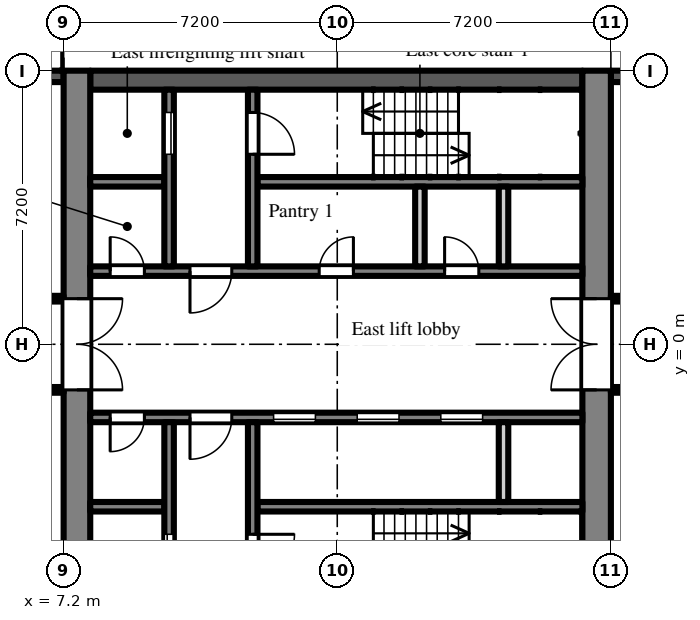
"""IFC4 building model, lengths in metres.
Left out: names, types, materials, properties, quantities, classifications, styles, units other than length and angle.
Written with IfcOpenShell. Run it as: python <this file> out.ifc"""

import sys

from ifc_helpers import new_model, si_unit, direction, frame, frame_2d, origin, place, context, subcontext, project, spatial, rectangle, extrude, element, fill, save


model = new_model("IFC4")
c1 = context("Model", 3, precision=1e-05, world=origin(), true_north=direction((0.0, 1.0)))
c2 = subcontext(c1, "Body", "Model", "MODEL_VIEW")
j1 = project(units=[si_unit("LENGTHUNIT", "METRE"), si_unit("PLANEANGLEUNIT", "RADIAN")], contexts=[c1])
p1 = place(None, origin())
s1 = spatial("IfcSite", under=j1, at=p1, CompositionType="ELEMENT")
p2 = place(p1, origin())
s2 = spatial("IfcBuilding", under=s1, at=p2, CompositionType="ELEMENT")
p3 = place(p2, frame((0.0, 0.0, 84.9)))
s3 = spatial("IfcBuildingStorey", under=s2, at=p3, CompositionType="ELEMENT", Elevation=84.9)
p4 = place(p3, frame((24.3, 7.05, 0.0), z_axis=(0.0, 0.0, 1.0), x_axis=(-1.0, 0.0, 0.0)))
e1 = element("IfcWall", 1, at=p4, inside=s3, PredefinedType="SOLIDWALL", context=c2, shape_type="SweptSolid", body=[
    extrude(rectangle(XDim=2.7, YDim=0.3, at=frame_2d((1.35, 0.0))), origin(), (0.0, 0.0, 1.0), 2.1),
])
p5 = place(p4, frame((0.75, 0.0, 0.2)))
e2 = element("IfcOpeningElement", 2, at=p5, cuts=e1, PredefinedType="OPENING", context=c2, shape_type="SweptSolid", body=[
    extrude(rectangle(XDim=1.2, YDim=1.85, at=frame_2d((0.6, 0.925))), frame((0.0, 0.16, 0.0), z_axis=(0.0, -1.0, 0.0), x_axis=(1.0, 0.0, 0.0)), (0.0, 0.0, 1.0), 0.32),
])
p6 = place(p3, frame((7.2, 7.05, 0.0), z_axis=(0.0, 0.0, 1.0), x_axis=(-1.0, 0.0, 0.0)))
e3 = element("IfcWall", 3, at=p6, inside=s3, PredefinedType="SOLIDWALL", context=c2, shape_type="SweptSolid", body=[
    extrude(rectangle(XDim=3.0, YDim=0.3, at=frame_2d((1.5, 0.0))), origin(), (0.0, 0.0, 1.0), 2.1),
])
p7 = place(p3, frame((7.55, -7.2, 0.0), z_axis=(0.0, 0.0, 1.0), x_axis=(0.0, 1.0, 0.0)))
e4 = element("IfcWall", 4, at=p7, inside=s3, PredefinedType="SHEAR", context=c2, shape_type="SweptSolid", body=[
    extrude(rectangle(XDim=14.4, YDim=0.7, at=frame_2d((7.2, 0.0))), origin(), (0.0, 0.0, 1.0), 2.575),
])
p8 = place(p7, frame((6.0, 0.0, 0.0)))
e5 = element("IfcOpeningElement", 5, at=p8, cuts=e4, PredefinedType="OPENING", context=c2, shape_type="SweptSolid", body=[
    extrude(rectangle(XDim=2.4, YDim=2.2, at=frame_2d((1.2, 1.1))), frame((0.0, 0.36, 0.0), z_axis=(0.0, -1.0, 0.0), x_axis=(1.0, 0.0, 0.0)), (0.0, 0.0, 1.0), 0.72),
])
p9 = place(p3, frame((21.225, -7.2, 0.0), z_axis=(0.0, 0.0, 1.0), x_axis=(0.0, 1.0, 0.0)))
e6 = element("IfcWall", 6, at=p9, inside=s3, PredefinedType="SHEAR", context=c2, shape_type="SweptSolid", body=[
    extrude(rectangle(XDim=14.4, YDim=0.75, at=frame_2d((7.2, 0.0))), origin(), (0.0, 0.0, 1.0), 2.575),
])
p10 = place(p9, frame((6.0, 0.0, 0.0)))
e7 = element("IfcOpeningElement", 7, at=p10, cuts=e6, PredefinedType="OPENING", context=c2, shape_type="SweptSolid", body=[
    extrude(rectangle(XDim=2.4, YDim=2.2, at=frame_2d((1.2, 1.1))), frame((0.0, 0.385, 0.0), z_axis=(0.0, -1.0, 0.0), x_axis=(1.0, 0.0, 0.0)), (0.0, 0.0, 1.0), 0.77),
])
p11 = place(p3, frame((7.9, 6.95, 0.0), z_axis=(0.0, 0.0, 1.0), x_axis=(1.0, 0.0, 0.0)))
e8 = element("IfcWall", 8, at=p11, inside=s3, PredefinedType="SHEAR", context=c2, shape_type="SweptSolid", body=[
    extrude(rectangle(XDim=12.95, YDim=0.5, at=frame_2d((6.475, 0.0))), origin(), (0.0, 0.0, 1.0), 2.575),
])
p12 = place(p3, frame((7.9, 1.925, 0.0), z_axis=(0.0, 0.0, 1.0), x_axis=(1.0, 0.0, 0.0)))
e9 = element("IfcWall", 9, at=p12, inside=s3, PredefinedType="SHEAR", context=c2, shape_type="SweptSolid", body=[
    extrude(rectangle(XDim=12.95, YDim=0.25, at=frame_2d((6.475, 0.0))), origin(), (0.0, 0.0, 1.0), 2.575),
])
p13 = place(p12, frame((0.525, 0.0, 0.0)))
e10 = element("IfcOpeningElement", 10, at=p13, cuts=e9, PredefinedType="OPENING", context=c2, shape_type="SweptSolid", body=[
    extrude(rectangle(XDim=0.9, YDim=2.1, at=frame_2d((0.45, 1.05))), frame((0.0, 0.135, 0.0), z_axis=(0.0, -1.0, 0.0), x_axis=(1.0, 0.0, 0.0)), (0.0, 0.0, 1.0), 0.27),
])
p14 = place(p12, frame((2.625, 0.0, 0.0)))
e11 = element("IfcOpeningElement", 11, at=p14, cuts=e9, PredefinedType="OPENING", context=c2, shape_type="SweptSolid", body=[
    extrude(rectangle(XDim=1.1, YDim=2.1, at=frame_2d((0.55, 1.05))), frame((0.0, 0.135, 0.0), z_axis=(0.0, -1.0, 0.0), x_axis=(1.0, 0.0, 0.0)), (0.0, 0.0, 1.0), 0.27),
])
p15 = place(p12, frame((6.025, 0.0, 0.0)))
e12 = element("IfcOpeningElement", 12, at=p15, cuts=e9, PredefinedType="OPENING", context=c2, shape_type="SweptSolid", body=[
    extrude(rectangle(XDim=0.9, YDim=2.1, at=frame_2d((0.45, 1.05))), frame((0.0, 0.135, 0.0), z_axis=(0.0, -1.0, 0.0), x_axis=(1.0, 0.0, 0.0)), (0.0, 0.0, 1.0), 0.27),
])
p16 = place(p12, frame((9.325, 0.0, 0.0)))
e13 = element("IfcOpeningElement", 13, at=p16, cuts=e9, PredefinedType="OPENING", context=c2, shape_type="SweptSolid", body=[
    extrude(rectangle(XDim=0.9, YDim=2.1, at=frame_2d((0.45, 1.05))), frame((0.0, 0.135, 0.0), z_axis=(0.0, -1.0, 0.0), x_axis=(1.0, 0.0, 0.0)), (0.0, 0.0, 1.0), 0.27),
])
p17 = place(p3, frame((7.9, 4.275, 0.0), z_axis=(0.0, 0.0, 1.0), x_axis=(1.0, 0.0, 0.0)))
e14 = element("IfcWall", 14, at=p17, inside=s3, PredefinedType="SHEAR", context=c2, shape_type="SweptSolid", body=[
    extrude(rectangle(XDim=1.95, YDim=0.25, at=frame_2d((0.975, 0.0))), origin(), (0.0, 0.0, 1.0), 2.575),
])
p18 = place(p3, frame((12.3, 4.275, 0.0), z_axis=(0.0, 0.0, 1.0), x_axis=(1.0, 0.0, 0.0)))
e15 = element("IfcWall", 15, at=p18, inside=s3, PredefinedType="SHEAR", context=c2, shape_type="SweptSolid", body=[
    extrude(rectangle(XDim=8.55, YDim=0.25, at=frame_2d((4.275, 0.0))), origin(), (0.0, 0.0, 1.0), 2.575),
])
p19 = place(p3, frame((9.975, 2.05, 0.0), z_axis=(0.0, 0.0, 1.0), x_axis=(0.0, 1.0, 0.0)))
e16 = element("IfcWall", 16, at=p19, inside=s3, PredefinedType="SHEAR", context=c2, shape_type="SweptSolid", body=[
    extrude(rectangle(XDim=4.65, YDim=0.25, at=frame_2d((2.325, 0.0))), origin(), (0.0, 0.0, 1.0), 2.575),
])
p20 = place(p19, frame((2.95, 0.0, 0.0)))
e17 = element("IfcOpeningElement", 17, at=p20, cuts=e16, PredefinedType="OPENING", context=c2, shape_type="SweptSolid", body=[
    extrude(rectangle(XDim=1.1, YDim=2.1, at=frame_2d((0.55, 1.05))), frame((0.0, 0.135, 0.0), z_axis=(0.0, -1.0, 0.0), x_axis=(1.0, 0.0, 0.0)), (0.0, 0.0, 1.0), 0.27),
])
p21 = place(p3, frame((12.175, 2.05, 0.0), z_axis=(0.0, 0.0, 1.0), x_axis=(0.0, 1.0, 0.0)))
e18 = element("IfcWall", 18, at=p21, inside=s3, PredefinedType="SHEAR", context=c2, shape_type="SweptSolid", body=[
    extrude(rectangle(XDim=4.65, YDim=0.25, at=frame_2d((2.325, 0.0))), origin(), (0.0, 0.0, 1.0), 2.575),
])
p22 = place(p21, frame((2.95, 0.0, 0.0)))
e19 = element("IfcOpeningElement", 19, at=p22, cuts=e18, PredefinedType="OPENING", context=c2, shape_type="SweptSolid", body=[
    extrude(rectangle(XDim=1.1, YDim=2.1, at=frame_2d((0.55, 1.05))), frame((0.0, 0.135, 0.0), z_axis=(0.0, -1.0, 0.0), x_axis=(1.0, 0.0, 0.0)), (0.0, 0.0, 1.0), 0.27),
])
for number, where, z_axis, x_axis in (
    (20, (16.575, 2.05, 0.0), (0.0, 0.0, 1.0), (0.0, 1.0, 0.0)),
    (21, (18.775, 2.05, 0.0), (0.0, 0.0, 1.0), (0.0, 1.0, 0.0)),
):
    element("IfcWall", number, at=place(p3, frame(where, z_axis=z_axis, x_axis=x_axis)), inside=s3, PredefinedType="PARTITIONING", context=c2, shape_type="SweptSolid", body=[
        extrude(rectangle(XDim=2.1, YDim=0.25, at=frame_2d((1.05, 0.0))), origin(), (0.0, 0.0, 1.0), 2.575),
    ])
p23 = place(p3, frame((7.9, -1.925, 0.0), z_axis=(0.0, 0.0, 1.0), x_axis=(1.0, 0.0, 0.0)))
e22 = element("IfcWall", 22, at=p23, inside=s3, PredefinedType="SHEAR", context=c2, shape_type="SweptSolid", body=[
    extrude(rectangle(XDim=12.95, YDim=0.25, at=frame_2d((6.475, 0.0))), origin(), (0.0, 0.0, 1.0), 2.575),
])
p24 = place(p23, frame((4.825, 0.0, 0.0)))
e23 = element("IfcOpeningElement", 23, at=p24, cuts=e22, PredefinedType="OPENING", context=c2, shape_type="SweptSolid", body=[
    extrude(rectangle(XDim=1.1, YDim=2.1, at=frame_2d((0.55, 1.05))), frame((0.0, 0.135, 0.0), z_axis=(0.0, -1.0, 0.0), x_axis=(1.0, 0.0, 0.0)), (0.0, 0.0, 1.0), 0.27),
])
p25 = place(p23, frame((7.025, 0.0, 0.0)))
e24 = element("IfcOpeningElement", 24, at=p25, cuts=e22, PredefinedType="OPENING", context=c2, shape_type="SweptSolid", body=[
    extrude(rectangle(XDim=1.1, YDim=2.1, at=frame_2d((0.55, 1.05))), frame((0.0, 0.135, 0.0), z_axis=(0.0, -1.0, 0.0), x_axis=(1.0, 0.0, 0.0)), (0.0, 0.0, 1.0), 0.27),
])
p26 = place(p23, frame((9.225, 0.0, 0.0)))
e25 = element("IfcOpeningElement", 25, at=p26, cuts=e22, PredefinedType="OPENING", context=c2, shape_type="SweptSolid", body=[
    extrude(rectangle(XDim=1.1, YDim=2.1, at=frame_2d((0.55, 1.05))), frame((0.0, 0.135, 0.0), z_axis=(0.0, -1.0, 0.0), x_axis=(1.0, 0.0, 0.0)), (0.0, 0.0, 1.0), 0.27),
])
p27 = place(p23, frame((0.525, 0.0, 0.0)))
e26 = element("IfcOpeningElement", 26, at=p27, cuts=e22, PredefinedType="OPENING", context=c2, shape_type="SweptSolid", body=[
    extrude(rectangle(XDim=0.9, YDim=2.1, at=frame_2d((0.45, 1.05))), frame((0.0, 0.135, 0.0), z_axis=(0.0, -1.0, 0.0), x_axis=(1.0, 0.0, 0.0)), (0.0, 0.0, 1.0), 0.27),
])
p28 = place(p23, frame((2.625, 0.0, 0.0)))
e27 = element("IfcOpeningElement", 27, at=p28, cuts=e22, PredefinedType="OPENING", context=c2, shape_type="SweptSolid", body=[
    extrude(rectangle(XDim=1.1, YDim=2.1, at=frame_2d((0.55, 1.05))), frame((0.0, 0.135, 0.0), z_axis=(0.0, -1.0, 0.0), x_axis=(1.0, 0.0, 0.0)), (0.0, 0.0, 1.0), 0.27),
])
p29 = place(p3, frame((7.9, -4.275, 0.0), z_axis=(0.0, 0.0, 1.0), x_axis=(1.0, 0.0, 0.0)))
e28 = element("IfcWall", 28, at=p29, inside=s3, PredefinedType="SHEAR", context=c2, shape_type="SweptSolid", body=[
    extrude(rectangle(XDim=1.95, YDim=0.25, at=frame_2d((0.975, 0.0))), origin(), (0.0, 0.0, 1.0), 2.575),
])
p30 = place(p3, frame((12.3, -4.275, 0.0), z_axis=(0.0, 0.0, 1.0), x_axis=(1.0, 0.0, 0.0)))
e29 = element("IfcWall", 29, at=p30, inside=s3, PredefinedType="SHEAR", context=c2, shape_type="SweptSolid", body=[
    extrude(rectangle(XDim=8.55, YDim=0.25, at=frame_2d((4.275, 0.0))), origin(), (0.0, 0.0, 1.0), 2.575),
])
p31 = place(p3, frame((9.975, -2.05, 0.0), z_axis=(0.0, 0.0, 1.0), x_axis=(0.0, -1.0, 0.0)))
e30 = element("IfcWall", 30, at=p31, inside=s3, PredefinedType="SHEAR", context=c2, shape_type="SweptSolid", body=[
    extrude(rectangle(XDim=4.65, YDim=0.25, at=frame_2d((2.325, 0.0))), origin(), (0.0, 0.0, 1.0), 2.575),
])
p32 = place(p31, frame((2.95, 0.0, 0.0)))
e31 = element("IfcOpeningElement", 31, at=p32, cuts=e30, PredefinedType="OPENING", context=c2, shape_type="SweptSolid", body=[
    extrude(rectangle(XDim=1.1, YDim=2.1, at=frame_2d((0.55, 1.05))), frame((0.0, 0.135, 0.0), z_axis=(0.0, -1.0, 0.0), x_axis=(1.0, 0.0, 0.0)), (0.0, 0.0, 1.0), 0.27),
])
p33 = place(p3, frame((12.175, -2.05, 0.0), z_axis=(0.0, 0.0, 1.0), x_axis=(0.0, -1.0, 0.0)))
e32 = element("IfcWall", 32, at=p33, inside=s3, PredefinedType="SHEAR", context=c2, shape_type="SweptSolid", body=[
    extrude(rectangle(XDim=4.65, YDim=0.25, at=frame_2d((2.325, 0.0))), origin(), (0.0, 0.0, 1.0), 2.575),
])
p34 = place(p33, frame((2.95, 0.0, 0.0)))
e33 = element("IfcOpeningElement", 33, at=p34, cuts=e32, PredefinedType="OPENING", context=c2, shape_type="SweptSolid", body=[
    extrude(rectangle(XDim=1.1, YDim=2.1, at=frame_2d((0.55, 1.05))), frame((0.0, 0.135, 0.0), z_axis=(0.0, -1.0, 0.0), x_axis=(1.0, 0.0, 0.0)), (0.0, 0.0, 1.0), 0.27),
])
p35 = place(p3, frame((18.775, -2.05, 0.0), z_axis=(0.0, 0.0, 1.0), x_axis=(0.0, -1.0, 0.0)))
e34 = element("IfcWall", 34, at=p35, inside=s3, PredefinedType="PARTITIONING", context=c2, shape_type="SweptSolid", body=[
    extrude(rectangle(XDim=2.1, YDim=0.25, at=frame_2d((1.05, 0.0))), origin(), (0.0, 0.0, 1.0), 2.575),
])
p36 = place(p3, frame((1.275, -1.2, 0.0), z_axis=(0.0, 0.0, 1.0), x_axis=(1.0, 0.0, 0.0)))
e35 = element("IfcWall", 35, at=p36, inside=s3, PredefinedType="PARTITIONING", context=c2, shape_type="SweptSolid", body=[
    extrude(rectangle(XDim=5.925, YDim=0.15, at=frame_2d((2.962, 0.0))), origin(), (0.0, 0.0, 1.0), 2.575),
])
p37 = place(p36, frame((3.475, 0.0, 0.0)))
e36 = element("IfcOpeningElement", 36, at=p37, cuts=e35, PredefinedType="OPENING", context=c2, shape_type="SweptSolid", body=[
    extrude(rectangle(XDim=0.9, YDim=2.1, at=frame_2d((0.45, 1.05))), frame((0.0, 0.085, 0.0), z_axis=(0.0, -1.0, 0.0), x_axis=(1.0, 0.0, 0.0)), (0.0, 0.0, 1.0), 0.17),
])
p38 = place(p3, frame((1.275, 1.2, 0.0), z_axis=(0.0, 0.0, 1.0), x_axis=(1.0, 0.0, 0.0)))
e37 = element("IfcWall", 37, at=p38, inside=s3, PredefinedType="PARTITIONING", context=c2, shape_type="SweptSolid", body=[
    extrude(rectangle(XDim=5.925, YDim=0.15, at=frame_2d((2.962, 0.0))), origin(), (0.0, 0.0, 1.0), 2.575),
])
p39 = place(p38, frame((0.675, 0.0, 0.0)))
e38 = element("IfcOpeningElement", 38, at=p39, cuts=e37, PredefinedType="OPENING", context=c2, shape_type="SweptSolid", body=[
    extrude(rectangle(XDim=0.9, YDim=2.1, at=frame_2d((0.45, 1.05))), frame((0.0, 0.085, 0.0), z_axis=(0.0, -1.0, 0.0), x_axis=(1.0, 0.0, 0.0)), (0.0, 0.0, 1.0), 0.17),
])
p40 = place(p38, frame((3.075, 0.0, 0.0)))
e39 = element("IfcOpeningElement", 39, at=p40, cuts=e37, PredefinedType="OPENING", context=c2, shape_type="SweptSolid", body=[
    extrude(rectangle(XDim=0.9, YDim=2.1, at=frame_2d((0.45, 1.05))), frame((0.0, 0.085, 0.0), z_axis=(0.0, -1.0, 0.0), x_axis=(1.0, 0.0, 0.0)), (0.0, 0.0, 1.0), 0.17),
])
p41 = place(p3, frame((21.6, -1.2, 0.0), z_axis=(0.0, 0.0, 1.0), x_axis=(1.0, 0.0, 0.0)))
e40 = element("IfcWall", 40, at=p41, inside=s3, PredefinedType="PARTITIONING", context=c2, shape_type="SweptSolid", body=[
    extrude(rectangle(XDim=14.9, YDim=0.15, at=frame_2d((7.45, 0.0))), origin(), (0.0, 0.0, 1.0), 2.575),
])
p42 = place(p41, frame((2.7, 0.0, 0.0)))
e41 = element("IfcOpeningElement", 41, at=p42, cuts=e40, PredefinedType="OPENING", context=c2, shape_type="SweptSolid", body=[
    extrude(rectangle(XDim=1.8, YDim=2.1, at=frame_2d((0.9, 1.05))), frame((0.0, 0.085, 0.0), z_axis=(0.0, -1.0, 0.0), x_axis=(1.0, 0.0, 0.0)), (0.0, 0.0, 1.0), 0.17),
])
p43 = place(p41, frame((8.55, 0.0, 0.0)))
e42 = element("IfcOpeningElement", 42, at=p43, cuts=e40, PredefinedType="OPENING", context=c2, shape_type="SweptSolid", body=[
    extrude(rectangle(XDim=0.9, YDim=2.1, at=frame_2d((0.45, 1.05))), frame((0.0, 0.085, 0.0), z_axis=(0.0, -1.0, 0.0), x_axis=(1.0, 0.0, 0.0)), (0.0, 0.0, 1.0), 0.17),
])
p44 = place(p41, frame((11.95, 0.0, 0.0)))
e43 = element("IfcOpeningElement", 43, at=p44, cuts=e40, PredefinedType="OPENING", context=c2, shape_type="SweptSolid", body=[
    extrude(rectangle(XDim=1.8, YDim=2.1, at=frame_2d((0.9, 1.05))), frame((0.0, 0.085, 0.0), z_axis=(0.0, -1.0, 0.0), x_axis=(1.0, 0.0, 0.0)), (0.0, 0.0, 1.0), 0.17),
])
p45 = place(p3, frame((21.6, 1.2, 0.0), z_axis=(0.0, 0.0, 1.0), x_axis=(1.0, 0.0, 0.0)))
e44 = element("IfcWall", 44, at=p45, inside=s3, PredefinedType="PARTITIONING", context=c2, shape_type="SweptSolid", body=[
    extrude(rectangle(XDim=14.9, YDim=0.15, at=frame_2d((7.45, 0.0))), origin(), (0.0, 0.0, 1.0), 2.575),
])
p46 = place(p45, frame((6.0, 0.0, 0.0)))
e45 = element("IfcOpeningElement", 45, at=p46, cuts=e44, PredefinedType="OPENING", context=c2, shape_type="SweptSolid", body=[
    extrude(rectangle(XDim=1.0, YDim=2.1, at=frame_2d((0.5, 1.05))), frame((0.0, 0.085, 0.0), z_axis=(0.0, -1.0, 0.0), x_axis=(1.0, 0.0, 0.0)), (0.0, 0.0, 1.0), 0.17),
])
p47 = place(p45, frame((9.6, 0.0, 0.0)))
e46 = element("IfcOpeningElement", 46, at=p47, cuts=e44, PredefinedType="OPENING", context=c2, shape_type="SweptSolid", body=[
    extrude(rectangle(XDim=1.0, YDim=2.1, at=frame_2d((0.5, 1.05))), frame((0.0, 0.085, 0.0), z_axis=(0.0, -1.0, 0.0), x_axis=(1.0, 0.0, 0.0)), (0.0, 0.0, 1.0), 0.17),
])
p48 = place(p45, frame((11.95, 0.0, 0.0)))
e47 = element("IfcOpeningElement", 47, at=p48, cuts=e44, PredefinedType="OPENING", context=c2, shape_type="SweptSolid", body=[
    extrude(rectangle(XDim=1.8, YDim=2.1, at=frame_2d((0.9, 1.05))), frame((0.0, 0.085, 0.0), z_axis=(0.0, -1.0, 0.0), x_axis=(1.0, 0.0, 0.0)), (0.0, 0.0, 1.0), 0.17),
])
p49 = place(p24, origin())
e48 = element("IfcDoor", 48, at=p49, inside=s3, OperationType="SLIDING_TO_LEFT", PredefinedType="DOOR", context=c2, shape_type="SweptSolid", body=[
    extrude(rectangle(XDim=1.1, YDim=2.1, at=frame_2d((0.55, 1.05))), frame((0.0, 0.025, 0.0), z_axis=(0.0, -1.0, 0.0), x_axis=(1.0, 0.0, 0.0)), (0.0, 0.0, 1.0), 0.05),
])
fill(e23, e48)
p50 = place(p25, origin())
e49 = element("IfcDoor", 49, at=p50, inside=s3, OperationType="SLIDING_TO_LEFT", PredefinedType="DOOR", context=c2, shape_type="SweptSolid", body=[
    extrude(rectangle(XDim=1.1, YDim=2.1, at=frame_2d((0.55, 1.05))), frame((0.0, 0.025, 0.0), z_axis=(0.0, -1.0, 0.0), x_axis=(1.0, 0.0, 0.0)), (0.0, 0.0, 1.0), 0.05),
])
fill(e24, e49)
p51 = place(p26, origin())
e50 = element("IfcDoor", 50, at=p51, inside=s3, OperationType="SLIDING_TO_LEFT", PredefinedType="DOOR", context=c2, shape_type="SweptSolid", body=[
    extrude(rectangle(XDim=1.1, YDim=2.1, at=frame_2d((0.55, 1.05))), frame((0.0, 0.025, 0.0), z_axis=(0.0, -1.0, 0.0), x_axis=(1.0, 0.0, 0.0)), (0.0, 0.0, 1.0), 0.05),
])
fill(e25, e50)
p52 = place(p20, origin())
e51 = element("IfcDoor", 51, at=p52, inside=s3, OperationType="SLIDING_TO_LEFT", PredefinedType="DOOR", context=c2, shape_type="SweptSolid", body=[
    extrude(rectangle(XDim=1.1, YDim=2.1, at=frame_2d((0.55, 1.05))), frame((0.0, 0.025, 0.0), z_axis=(0.0, -1.0, 0.0), x_axis=(1.0, 0.0, 0.0)), (0.0, 0.0, 1.0), 0.05),
])
fill(e17, e51)
p53 = place(p32, origin())
e52 = element("IfcDoor", 52, at=p53, inside=s3, OperationType="SLIDING_TO_LEFT", PredefinedType="DOOR", context=c2, shape_type="SweptSolid", body=[
    extrude(rectangle(XDim=1.1, YDim=2.1, at=frame_2d((0.55, 1.05))), frame((0.0, 0.025, 0.0), z_axis=(0.0, -1.0, 0.0), x_axis=(1.0, 0.0, 0.0)), (0.0, 0.0, 1.0), 0.05),
])
fill(e31, e52)
p54 = place(p22, frame((1.1, 0.0, 0.0), z_axis=(0.0, 0.0, 1.0), x_axis=(-1.0, 0.0, 0.0)))
e53 = element("IfcDoor", 53, at=p54, inside=s3, OperationType="SINGLE_SWING_RIGHT", PredefinedType="DOOR", context=c2, shape_type="SweptSolid", body=[
    extrude(rectangle(XDim=1.1, YDim=2.1, at=frame_2d((0.55, 1.05))), frame((0.0, 0.025, 0.0), z_axis=(0.0, -1.0, 0.0), x_axis=(1.0, 0.0, 0.0)), (0.0, 0.0, 1.0), 0.05),
])
fill(e19, e53)
p55 = place(p34, origin())
e54 = element("IfcDoor", 54, at=p55, inside=s3, OperationType="SINGLE_SWING_LEFT", PredefinedType="DOOR", context=c2, shape_type="SweptSolid", body=[
    extrude(rectangle(XDim=1.1, YDim=2.1, at=frame_2d((0.55, 1.05))), frame((0.0, 0.025, 0.0), z_axis=(0.0, -1.0, 0.0), x_axis=(1.0, 0.0, 0.0)), (0.0, 0.0, 1.0), 0.05),
])
fill(e33, e54)
p56 = place(p13, origin())
e55 = element("IfcDoor", 55, at=p56, inside=s3, OperationType="SINGLE_SWING_LEFT", PredefinedType="DOOR", context=c2, shape_type="SweptSolid", body=[
    extrude(rectangle(XDim=0.9, YDim=2.1, at=frame_2d((0.45, 1.05))), frame((0.0, 0.025, 0.0), z_axis=(0.0, -1.0, 0.0), x_axis=(1.0, 0.0, 0.0)), (0.0, 0.0, 1.0), 0.05),
])
fill(e10, e55)
p57 = place(p27, frame((0.9, 0.0, 0.0), z_axis=(0.0, 0.0, 1.0), x_axis=(-1.0, 0.0, 0.0)))
e56 = element("IfcDoor", 56, at=p57, inside=s3, OperationType="SINGLE_SWING_RIGHT", PredefinedType="DOOR", context=c2, shape_type="SweptSolid", body=[
    extrude(rectangle(XDim=0.9, YDim=2.1, at=frame_2d((0.45, 1.05))), frame((0.0, 0.025, 0.0), z_axis=(0.0, -1.0, 0.0), x_axis=(1.0, 0.0, 0.0)), (0.0, 0.0, 1.0), 0.05),
])
fill(e26, e56)
p58 = place(p14, frame((1.1, 0.0, 0.0), z_axis=(0.0, 0.0, 1.0), x_axis=(-1.0, 0.0, 0.0)))
e57 = element("IfcDoor", 57, at=p58, inside=s3, OperationType="SINGLE_SWING_RIGHT", PredefinedType="DOOR", context=c2, shape_type="SweptSolid", body=[
    extrude(rectangle(XDim=1.1, YDim=2.1, at=frame_2d((0.55, 1.05))), frame((0.0, 0.025, 0.0), z_axis=(0.0, -1.0, 0.0), x_axis=(1.0, 0.0, 0.0)), (0.0, 0.0, 1.0), 0.05),
])
fill(e11, e57)
p59 = place(p28, frame((1.1, 0.0, 0.0), z_axis=(0.0, 0.0, 1.0), x_axis=(-1.0, 0.0, 0.0)))
e58 = element("IfcDoor", 58, at=p59, inside=s3, OperationType="SINGLE_SWING_RIGHT", PredefinedType="DOOR", context=c2, shape_type="SweptSolid", body=[
    extrude(rectangle(XDim=1.1, YDim=2.1, at=frame_2d((0.55, 1.05))), frame((0.0, 0.025, 0.0), z_axis=(0.0, -1.0, 0.0), x_axis=(1.0, 0.0, 0.0)), (0.0, 0.0, 1.0), 0.05),
])
fill(e27, e58)
p60 = place(p8, frame((2.4, 0.0, 0.0), z_axis=(0.0, 0.0, 1.0), x_axis=(-1.0, 0.0, 0.0)))
e59 = element("IfcDoor", 59, at=p60, inside=s3, OperationType="DOUBLE_DOOR_DOUBLE_SWING", PredefinedType="DOOR", context=c2, shape_type="SweptSolid", body=[
    extrude(rectangle(XDim=2.4, YDim=2.2, at=frame_2d((1.2, 1.1))), frame((0.0, 0.025, 0.0), z_axis=(0.0, -1.0, 0.0), x_axis=(1.0, 0.0, 0.0)), (0.0, 0.0, 1.0), 0.05),
])
fill(e5, e59)
p61 = place(p10, origin())
e60 = element("IfcDoor", 60, at=p61, inside=s3, OperationType="DOUBLE_DOOR_DOUBLE_SWING", PredefinedType="DOOR", context=c2, shape_type="SweptSolid", body=[
    extrude(rectangle(XDim=2.4, YDim=2.2, at=frame_2d((1.2, 1.1))), frame((0.0, 0.025, 0.0), z_axis=(0.0, -1.0, 0.0), x_axis=(1.0, 0.0, 0.0)), (0.0, 0.0, 1.0), 0.05),
])
fill(e7, e60)
p62 = place(p15, origin())
e61 = element("IfcDoor", 61, at=p62, inside=s3, OperationType="SINGLE_SWING_RIGHT", PredefinedType="DOOR", context=c2, shape_type="SweptSolid", body=[
    extrude(rectangle(XDim=0.9, YDim=2.1, at=frame_2d((0.45, 1.05))), frame((0.0, 0.025, 0.0), z_axis=(0.0, -1.0, 0.0), x_axis=(1.0, 0.0, 0.0)), (0.0, 0.0, 1.0), 0.05),
])
fill(e12, e61)
p63 = place(p16, origin())
e62 = element("IfcDoor", 62, at=p63, inside=s3, OperationType="SINGLE_SWING_LEFT", PredefinedType="DOOR", context=c2, shape_type="SweptSolid", body=[
    extrude(rectangle(XDim=0.9, YDim=2.1, at=frame_2d((0.45, 1.05))), frame((0.0, 0.025, 0.0), z_axis=(0.0, -1.0, 0.0), x_axis=(1.0, 0.0, 0.0)), (0.0, 0.0, 1.0), 0.05),
])
fill(e13, e62)
save(model, sys.argv[1])
